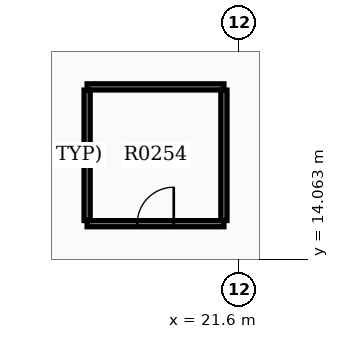
"""IFC4 building model, lengths in metres.
Left out: names, types, materials, properties, quantities, classifications, styles, units other than length and angle.
Written with IfcOpenShell. Run it as: python <this file> out.ifc"""

import sys

from ifc_helpers import new_model, si_unit, direction, frame, frame_2d, origin, place, context, subcontext, project, spatial, rectangle, extrude, element, fill, save


model = new_model("IFC4")
c1 = context("Model", 3, precision=1e-05, world=origin(), true_north=direction((0.0, 1.0)))
c2 = subcontext(c1, "Body", "Model", "MODEL_VIEW")
j1 = project(units=[si_unit("LENGTHUNIT", "METRE"), si_unit("PLANEANGLEUNIT", "RADIAN")], contexts=[c1])
p1 = place(None, origin())
s1 = spatial("IfcSite", under=j1, at=p1, CompositionType="ELEMENT")
p2 = place(p1, origin())
s2 = spatial("IfcBuilding", under=s1, at=p2, CompositionType="ELEMENT")
p3 = place(p2, frame((0.0, 0.0, 19.2)))
s3 = spatial("IfcBuildingStorey", under=s2, at=p3, CompositionType="ELEMENT", Elevation=19.2)
p4 = place(p3, frame((17.6, 15.0, 0.0), z_axis=(0.0, 0.0, 1.0), x_axis=(1.0, 0.0, 0.0)))
e1 = element("IfcWall", 1, at=p4, inside=s3, PredefinedType="PARTITIONING", context=c2, shape_type="SweptSolid", body=[
    extrude(rectangle(XDim=3.6, YDim=0.16, at=frame_2d((1.8, 0.0))), origin(), (0.0, 0.0, 1.0), 3.37),
])
p5 = place(p4, frame((1.32, 0.0, 0.0)))
e2 = element("IfcOpeningElement", 2, at=p5, cuts=e1, PredefinedType="OPENING", context=c2, shape_type="SweptSolid", body=[
    extrude(rectangle(XDim=0.96, YDim=2.15, at=frame_2d((0.48, 1.075))), frame((0.0, 0.09, 0.0), z_axis=(0.0, -1.0, 0.0), x_axis=(1.0, 0.0, 0.0)), (0.0, 0.0, 1.0), 0.18),
])
p6 = place(p3, frame((17.6, 18.6, 0.0), z_axis=(0.0, 0.0, 1.0), x_axis=(1.0, 0.0, 0.0)))
e3 = element("IfcWall", 3, at=p6, inside=s3, PredefinedType="PARTITIONING", context=c2, shape_type="SweptSolid", body=[
    extrude(rectangle(XDim=3.6, YDim=0.16, at=frame_2d((1.8, 0.0))), origin(), (0.0, 0.0, 1.0), 3.37),
])
for number, where, z_axis, x_axis in (
    (4, (17.6, 15.085, 0.0), (0.0, 0.0, 1.0), (0.0, 1.0, 0.0)),
    (5, (21.2, 15.085, 0.0), (0.0, 0.0, 1.0), (0.0, 1.0, 0.0)),
):
    element("IfcWall", number, at=place(p3, frame(where, z_axis=z_axis, x_axis=x_axis)), inside=s3, PredefinedType="PARTITIONING", context=c2, shape_type="SweptSolid", body=[
        extrude(rectangle(XDim=3.43, YDim=0.16, at=frame_2d((1.715, 0.0))), origin(), (0.0, 0.0, 1.0), 3.37),
    ])
p7 = place(p5, origin())
e6 = element("IfcDoor", 6, at=p7, inside=s3, OperationType="SINGLE_SWING_RIGHT", PredefinedType="DOOR", context=c2, shape_type="SweptSolid", body=[
    extrude(rectangle(XDim=0.96, YDim=2.15, at=frame_2d((0.48, 1.075))), frame((0.0, 0.025, 0.0), z_axis=(0.0, -1.0, 0.0), x_axis=(1.0, 0.0, 0.0)), (0.0, 0.0, 1.0), 0.05),
])
fill(e2, e6)
save(model, sys.argv[1])
